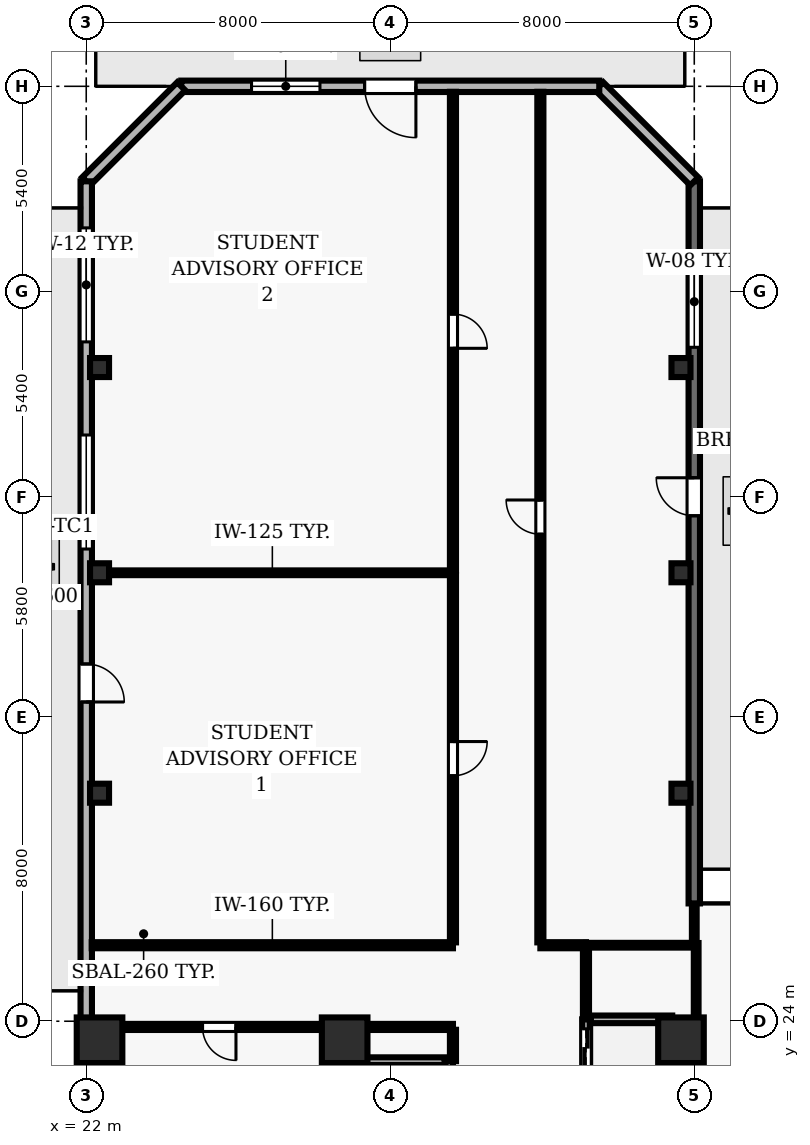
"""IFC4 building model, lengths in metres.
Left out: names, types, materials, properties, quantities, classifications, styles, units other than length and angle.
Written with IfcOpenShell. Run it as: python <this file> out.ifc"""

import sys

from ifc_helpers import new_model, si_unit, direction, frame, frame_2d, origin, origin_2d, place, context, subcontext, project, spatial, rectangle, hollow_rectangle, extrude, element, fill, save


model = new_model("IFC4")
c1 = context("Model", 3, precision=1e-05, world=origin(), true_north=direction((0.0, 1.0)))
c2 = subcontext(c1, "Body", "Model", "MODEL_VIEW")
j1 = project(units=[si_unit("LENGTHUNIT", "METRE"), si_unit("PLANEANGLEUNIT", "RADIAN")], contexts=[c1])
p1 = place(None, origin())
s1 = spatial("IfcSite", under=j1, at=p1, CompositionType="ELEMENT")
p2 = place(p1, origin())
s2 = spatial("IfcBuilding", under=s1, at=p2, CompositionType="ELEMENT")
p3 = place(p2, frame((0.0, 0.0, 98.4)))
s3 = spatial("IfcBuildingStorey", under=s2, at=p3, CompositionType="ELEMENT", Elevation=98.4)
for number, where, z_axis, x_axis in (
    (1, (22.35, 23.5, 0.0), (0.0, 0.0, 1.0), (1.0, 0.0, 0.0)),
    (2, (28.8, 23.5, 0.0), (0.0, 0.0, 1.0), (1.0, 0.0, 0.0)),
    (3, (37.65, 23.5, 0.0), (0.0, 0.0, 1.0), (1.0, 0.0, 0.0)),
):
    element("IfcColumn", number, at=place(p3, frame(where, z_axis=z_axis, x_axis=x_axis)), inside=s3, PredefinedType="COLUMN", context=c2, shape_type="SweptSolid", body=[
        extrude(rectangle(XDim=1.2, YDim=1.2, at=origin_2d()), origin(), (0.0, 0.0, 1.0), 5.0),
    ])
for number, where, z_axis, x_axis in (
    (4, (22.35, 30.0, 0.0), (0.0, 0.0, 1.0), (1.0, 0.0, 0.0)),
    (5, (37.65, 30.0, 0.0), (0.0, 0.0, 1.0), (1.0, 0.0, 0.0)),
    (6, (22.35, 35.8, 0.0), (0.0, 0.0, 1.0), (1.0, 0.0, 0.0)),
    (7, (37.65, 35.8, 0.0), (0.0, 0.0, 1.0), (1.0, 0.0, 0.0)),
    (8, (22.35, 41.2, 0.0), (0.0, 0.0, 1.0), (1.0, 0.0, 0.0)),
    (9, (37.65, 41.2, 0.0), (0.0, 0.0, 1.0), (1.0, 0.0, 0.0)),
):
    element("IfcColumn", number, at=place(p3, frame(where, z_axis=z_axis, x_axis=x_axis)), inside=s3, PredefinedType="COLUMN", context=c2, shape_type="SweptSolid", body=[
        extrude(hollow_rectangle(XDim=0.5, YDim=0.5, WallThickness=0.025, at=origin_2d()), origin(), (0.0, 0.0, 1.0), 5.0),
    ])
p4 = place(p3, frame((38.0, 27.1, 0.0), z_axis=(0.0, 0.0, 1.0), x_axis=(0.0, 1.0, 0.0)))
e10 = element("IfcWall", 10, at=p4, inside=s3, PredefinedType="SOLIDWALL", context=c2, shape_type="SweptSolid", body=[
    extrude(rectangle(XDim=19.0, YDim=0.3, at=frame_2d((9.5, 0.0))), origin(), (0.0, 0.0, 1.0), 4.79),
])
p5 = place(p4, frame((10.2, 0.0, 0.0)))
e11 = element("IfcOpeningElement", 11, at=p5, cuts=e10, PredefinedType="OPENING", context=c2, shape_type="SweptSolid", body=[
    extrude(rectangle(XDim=1.0, YDim=2.2, at=frame_2d((0.5, 1.1))), frame((0.0, 0.16, 0.0), z_axis=(0.0, -1.0, 0.0), x_axis=(1.0, 0.0, 0.0)), (0.0, 0.0, 1.0), 0.32),
])
p6 = place(p4, frame((14.633, 0.0, 0.9)))
e12 = element("IfcOpeningElement", 12, at=p6, cuts=e10, PredefinedType="OPENING", context=c2, shape_type="SweptSolid", body=[
    extrude(rectangle(XDim=2.4, YDim=1.8, at=frame_2d((1.2, 0.9))), frame((0.0, 0.16, 0.0), z_axis=(0.0, -1.0, 0.0), x_axis=(1.0, 0.0, 0.0)), (0.0, 0.0, 1.0), 0.32),
])
p7 = place(p3, frame((38.0, 46.1, 0.0), z_axis=(0.0, 0.0, 1.0), x_axis=(-0.707106781187, 0.707106781187, 0.0)))
e13 = element("IfcWall", 13, at=p7, inside=s3, PredefinedType="SOLIDWALL", context=c2, shape_type="SweptSolid", body=[
    extrude(rectangle(XDim=3.536, YDim=0.3, at=frame_2d((1.768, 0.0))), origin(), (0.0, 0.0, 1.0), 4.79),
])
p8 = place(p3, frame((35.5, 48.6, 0.0), z_axis=(0.0, 0.0, 1.0), x_axis=(-1.0, 0.0, 0.0)))
e14 = element("IfcWall", 14, at=p8, inside=s3, PredefinedType="SOLIDWALL", context=c2, shape_type="SweptSolid", body=[
    extrude(rectangle(XDim=11.0, YDim=0.3, at=frame_2d((5.5, 0.0))), origin(), (0.0, 0.0, 1.0), 4.79),
])
p9 = place(p8, frame((4.825, 0.0, 0.0)))
e15 = element("IfcOpeningElement", 15, at=p9, cuts=e14, PredefinedType="OPENING", context=c2, shape_type="SweptSolid", body=[
    extrude(rectangle(XDim=1.35, YDim=2.2, at=frame_2d((0.675, 1.1))), frame((0.0, 0.16, 0.0), z_axis=(0.0, -1.0, 0.0), x_axis=(1.0, 0.0, 0.0)), (0.0, 0.0, 1.0), 0.32),
])
p10 = place(p8, frame((7.35, 0.0, 0.9)))
e16 = element("IfcOpeningElement", 16, at=p10, cuts=e14, PredefinedType="OPENING", context=c2, shape_type="SweptSolid", body=[
    extrude(rectangle(XDim=1.8, YDim=2.2, at=frame_2d((0.9, 1.1))), frame((0.0, 0.16, 0.0), z_axis=(0.0, -1.0, 0.0), x_axis=(1.0, 0.0, 0.0)), (0.0, 0.0, 1.0), 0.32),
])
p11 = place(p3, frame((24.5, 48.6, 0.0), z_axis=(0.0, 0.0, 1.0), x_axis=(-0.707106781187, -0.707106781187, 0.0)))
e17 = element("IfcWall", 17, at=p11, inside=s3, PredefinedType="SOLIDWALL", context=c2, shape_type="SweptSolid", body=[
    extrude(rectangle(XDim=3.536, YDim=0.3, at=frame_2d((1.768, 0.0))), origin(), (0.0, 0.0, 1.0), 4.79),
])
p12 = place(p3, frame((22.0, 46.1, 0.0), z_axis=(0.0, 0.0, 1.0), x_axis=(0.0, -1.0, 0.0)))
e18 = element("IfcWall", 18, at=p12, inside=s3, PredefinedType="SOLIDWALL", context=c2, shape_type="SweptSolid", body=[
    extrude(rectangle(XDim=43.6, YDim=0.3, at=frame_2d((21.8, 0.0))), origin(), (0.0, 0.0, 1.0), 4.79),
])
p13 = place(p12, frame((12.7, 0.0, 0.0)))
e19 = element("IfcOpeningElement", 19, at=p13, cuts=e18, PredefinedType="OPENING", context=c2, shape_type="SweptSolid", body=[
    extrude(rectangle(XDim=1.0, YDim=2.2, at=frame_2d((0.5, 1.1))), frame((0.0, 0.16, 0.0), z_axis=(0.0, -1.0, 0.0), x_axis=(1.0, 0.0, 0.0)), (0.0, 0.0, 1.0), 0.32),
])
p14 = place(p12, frame((1.225, 0.0, 0.9)))
e20 = element("IfcOpeningElement", 20, at=p14, cuts=e18, PredefinedType="OPENING", context=c2, shape_type="SweptSolid", body=[
    extrude(rectangle(XDim=3.0, YDim=2.2, at=frame_2d((1.5, 1.1))), frame((0.0, 0.16, 0.0), z_axis=(0.0, -1.0, 0.0), x_axis=(1.0, 0.0, 0.0)), (0.0, 0.0, 1.0), 0.32),
])
p15 = place(p12, frame((6.675, 0.0, 0.9)))
e21 = element("IfcOpeningElement", 21, at=p15, cuts=e18, PredefinedType="OPENING", context=c2, shape_type="SweptSolid", body=[
    extrude(rectangle(XDim=3.0, YDim=2.2, at=frame_2d((1.5, 1.1))), frame((0.0, 0.16, 0.0), z_axis=(0.0, -1.0, 0.0), x_axis=(1.0, 0.0, 0.0)), (0.0, 0.0, 1.0), 0.32),
])
p16 = place(p12, frame((23.475, 0.0, 0.9)))
e22 = element("IfcOpeningElement", 22, at=p16, cuts=e18, PredefinedType="OPENING", context=c2, shape_type="SweptSolid", body=[
    extrude(rectangle(XDim=3.0, YDim=2.2, at=frame_2d((1.5, 1.1))), frame((0.0, 0.16, 0.0), z_axis=(0.0, -1.0, 0.0), x_axis=(1.0, 0.0, 0.0)), (0.0, 0.0, 1.0), 0.32),
])
p17 = place(p12, frame((33.925, 0.0, 0.9)))
e23 = element("IfcOpeningElement", 23, at=p17, cuts=e18, PredefinedType="OPENING", context=c2, shape_type="SweptSolid", body=[
    extrude(rectangle(XDim=3.0, YDim=2.2, at=frame_2d((1.5, 1.1))), frame((0.0, 0.16, 0.0), z_axis=(0.0, -1.0, 0.0), x_axis=(1.0, 0.0, 0.0)), (0.0, 0.0, 1.0), 0.32),
])
p18 = place(p3, frame((35.15, 24.05, 0.0), z_axis=(0.0, 0.0, 1.0), x_axis=(0.0, -1.0, 0.0)))
e24 = element("IfcWall", 24, at=p18, inside=s3, PredefinedType="SOLIDWALL", context=c2, shape_type="SweptSolid", body=[
    extrude(rectangle(XDim=1.5, YDim=0.2, at=frame_2d((0.75, 0.0))), origin(), (0.0, 0.0, 1.0), 4.79),
])
p19 = place(p18, frame((0.25, 0.0, 0.0)))
e25 = element("IfcOpeningElement", 25, at=p19, cuts=e24, PredefinedType="OPENING", context=c2, shape_type="SweptSolid", body=[
    extrude(rectangle(XDim=1.0, YDim=2.1, at=frame_2d((0.5, 1.05))), frame((0.0, 0.11, 0.0), z_axis=(0.0, -1.0, 0.0), x_axis=(1.0, 0.0, 0.0)), (0.0, 0.0, 1.0), 0.22),
])
p20 = place(p3, frame((37.7, 22.55, 0.0), z_axis=(0.0, 0.0, 1.0), x_axis=(0.0, 1.0, 0.0)))
e26 = element("IfcWall", 26, at=p20, inside=s3, PredefinedType="SHEAR", context=c2, shape_type="SweptSolid", body=[
    extrude(rectangle(XDim=1.5, YDim=0.5, at=frame_2d((0.75, 0.0))), origin(), (0.0, 0.0, 1.0), 4.79),
])
p21 = place(p3, frame((37.42, 24.05, 0.0), z_axis=(0.0, 0.0, 1.0), x_axis=(-1.0, 0.0, 0.0)))
e27 = element("IfcWall", 27, at=p21, inside=s3, PredefinedType="SOLIDWALL", context=c2, shape_type="SweptSolid", body=[
    extrude(rectangle(XDim=2.14, YDim=0.2, at=frame_2d((1.07, 0.0))), origin(), (0.0, 0.0, 1.0), 4.79),
])
p22 = place(p3, frame((28.85, 22.95, 0.0), z_axis=(0.0, 0.0, 1.0), x_axis=(0.0, -1.0, 0.0)))
e28 = element("IfcWall", 28, at=p22, inside=s3, PredefinedType="SOLIDWALL", context=c2, shape_type="SweptSolid", body=[
    extrude(rectangle(XDim=1.9, YDim=0.2, at=frame_2d((0.95, 0.0))), origin(), (0.0, 0.0, 1.0), 4.79),
])
p23 = place(p3, frame((31.55, 21.05, 0.0), z_axis=(0.0, 0.0, 1.0), x_axis=(0.0, 1.0, 0.0)))
e29 = element("IfcWall", 29, at=p23, inside=s3, PredefinedType="SOLIDWALL", context=c2, shape_type="SweptSolid", body=[
    extrude(rectangle(XDim=1.9, YDim=0.2, at=frame_2d((0.95, 0.0))), origin(), (0.0, 0.0, 1.0), 4.79),
])
p24 = place(p23, frame((0.45, 0.0, 0.0)))
e30 = element("IfcOpeningElement", 30, at=p24, cuts=e29, PredefinedType="OPENING", context=c2, shape_type="SweptSolid", body=[
    extrude(rectangle(XDim=1.0, YDim=2.1, at=frame_2d((0.5, 1.05))), frame((0.0, 0.11, 0.0), z_axis=(0.0, -1.0, 0.0), x_axis=(1.0, 0.0, 0.0)), (0.0, 0.0, 1.0), 0.22),
])
p25 = place(p3, frame((31.43, 22.95, 0.0), z_axis=(0.0, 0.0, 1.0), x_axis=(-1.0, 0.0, 0.0)))
e31 = element("IfcWall", 31, at=p25, inside=s3, PredefinedType="SOLIDWALL", context=c2, shape_type="SweptSolid", body=[
    extrude(rectangle(XDim=2.46, YDim=0.2, at=frame_2d((1.23, 0.0))), origin(), (0.0, 0.0, 1.0), 4.79),
])
p26 = place(p3, frame((28.8, 23.85, 0.0), z_axis=(0.0, 0.0, 1.0), x_axis=(-1.0, 0.0, 0.0)))
e32 = element("IfcWall", 32, at=p26, inside=s3, PredefinedType="PARTITIONING", context=c2, shape_type="SweptSolid", body=[
    extrude(rectangle(XDim=6.6, YDim=0.16, at=frame_2d((3.3, 0.0))), origin(), (0.0, 0.0, 1.0), 4.173),
])
p27 = place(p26, frame((2.86, 0.0, 0.0)))
e33 = element("IfcOpeningElement", 33, at=p27, cuts=e32, PredefinedType="OPENING", context=c2, shape_type="SweptSolid", body=[
    extrude(rectangle(XDim=0.88, YDim=2.1, at=frame_2d((0.44, 1.05))), frame((0.0, 0.09, 0.0), z_axis=(0.0, -1.0, 0.0), x_axis=(1.0, 0.0, 0.0)), (0.0, 0.0, 1.0), 0.18),
])
p28 = place(p3, frame((28.8, 23.85, 0.0), z_axis=(0.0, 0.0, 1.0), x_axis=(1.0, 0.0, 0.0)))
e34 = element("IfcWall", 34, at=p28, inside=s3, PredefinedType="PARTITIONING", context=c2, shape_type="SweptSolid", body=[
    extrude(rectangle(XDim=2.85, YDim=0.16, at=frame_2d((1.425, 0.0))), origin(), (0.0, 0.0, 1.0), 4.79),
])
p29 = place(p3, frame((31.65, 26.0, 0.0), z_axis=(0.0, 0.0, 1.0), x_axis=(-1.0, 0.0, 0.0)))
e35 = element("IfcWall", 35, at=p29, inside=s3, PredefinedType="PARTITIONING", context=c2, shape_type="SweptSolid", body=[
    extrude(rectangle(XDim=9.505, YDim=0.16, at=frame_2d((4.752, 0.0))), origin(), (0.0, 0.0, 1.0), 4.79),
])
p30 = place(p3, frame((31.65, 35.8, 0.0), z_axis=(0.0, 0.0, 1.0), x_axis=(-1.0, 0.0, 0.0)))
e36 = element("IfcWall", 36, at=p30, inside=s3, PredefinedType="PARTITIONING", context=c2, shape_type="SweptSolid", body=[
    extrude(rectangle(XDim=9.505, YDim=0.125, at=frame_2d((4.752, 0.0))), origin(), (0.0, 0.0, 1.0), 4.173),
])
p31 = place(p3, frame((35.15, 26.0, 0.0), z_axis=(0.0, 0.0, 1.0), x_axis=(-1.0, 0.0, 0.0)))
e37 = element("IfcWall", 37, at=p31, inside=s3, PredefinedType="PARTITIONING", context=c2, shape_type="SweptSolid", body=[
    extrude(rectangle(XDim=1.2, YDim=0.16, at=frame_2d((0.6, 0.0))), origin(), (0.0, 0.0, 1.0), 4.79),
])
p32 = place(p3, frame((35.15, 26.0, 0.0), z_axis=(0.0, 0.0, 1.0), x_axis=(1.0, 0.0, 0.0)))
e38 = element("IfcWall", 38, at=p32, inside=s3, PredefinedType="PARTITIONING", context=c2, shape_type="SweptSolid", body=[
    extrude(rectangle(XDim=2.85, YDim=0.125, at=frame_2d((1.425, 0.0))), origin(), (0.0, 0.0, 1.0), 4.79),
])
p33 = place(p3, frame((28.8, 22.95, 0.0), z_axis=(0.0, 0.0, 1.0), x_axis=(0.0, 1.0, 0.0)))
e39 = element("IfcWall", 39, at=p33, inside=s3, PredefinedType="PARTITIONING", context=c2, shape_type="SweptSolid", body=[
    extrude(rectangle(XDim=0.825, YDim=0.135, at=frame_2d((0.413, 0.0))), origin(), (0.0, 0.0, 1.0), 4.79),
])
p34 = place(p3, frame((31.65, 23.775, 0.0), z_axis=(0.0, 0.0, 1.0), x_axis=(0.0, -1.0, 0.0)))
e40 = element("IfcWall", 40, at=p34, inside=s3, PredefinedType="PARTITIONING", context=c2, shape_type="SweptSolid", body=[
    extrude(rectangle(XDim=0.825, YDim=0.16, at=frame_2d((0.413, 0.0))), origin(), (0.0, 0.0, 1.0), 4.79),
])
p35 = place(p3, frame((31.65, 35.742, 0.0), z_axis=(0.0, 0.0, 1.0), x_axis=(0.0, -1.0, 0.0)))
e41 = element("IfcWall", 41, at=p35, inside=s3, PredefinedType="PARTITIONING", context=c2, shape_type="SweptSolid", body=[
    extrude(rectangle(XDim=9.667, YDim=0.16, at=frame_2d((4.833, 0.0))), origin(), (0.0, 0.0, 1.0), 4.79),
])
p36 = place(p35, frame((4.383, 0.0, 0.0)))
e42 = element("IfcOpeningElement", 42, at=p36, cuts=e41, PredefinedType="OPENING", context=c2, shape_type="SweptSolid", body=[
    extrude(rectangle(XDim=0.9, YDim=2.1, at=frame_2d((0.45, 1.05))), frame((0.0, 0.09, 0.0), z_axis=(0.0, -1.0, 0.0), x_axis=(1.0, 0.0, 0.0)), (0.0, 0.0, 1.0), 0.18),
])
p37 = place(p3, frame((31.65, 48.455, 0.0), z_axis=(0.0, 0.0, 1.0), x_axis=(0.0, -1.0, 0.0)))
e43 = element("IfcWall", 43, at=p37, inside=s3, PredefinedType="PARTITIONING", context=c2, shape_type="SweptSolid", body=[
    extrude(rectangle(XDim=12.598, YDim=0.16, at=frame_2d((6.299, 0.0))), origin(), (0.0, 0.0, 1.0), 4.79),
])
p38 = place(p37, frame((5.849, 0.0, 0.0)))
e44 = element("IfcOpeningElement", 44, at=p38, cuts=e43, PredefinedType="OPENING", context=c2, shape_type="SweptSolid", body=[
    extrude(rectangle(XDim=0.9, YDim=2.1, at=frame_2d((0.45, 1.05))), frame((0.0, 0.09, 0.0), z_axis=(0.0, -1.0, 0.0), x_axis=(1.0, 0.0, 0.0)), (0.0, 0.0, 1.0), 0.18),
])
p39 = place(p3, frame((33.95, 26.075, 0.0), z_axis=(0.0, 0.0, 1.0), x_axis=(0.0, 1.0, 0.0)))
e45 = element("IfcWall", 45, at=p39, inside=s3, PredefinedType="PARTITIONING", context=c2, shape_type="SweptSolid", body=[
    extrude(rectangle(XDim=22.38, YDim=0.16, at=frame_2d((11.19, 0.0))), origin(), (0.0, 0.0, 1.0), 4.79),
])
p40 = place(p39, frame((10.74, 0.0, 0.0)))
e46 = element("IfcOpeningElement", 46, at=p40, cuts=e45, PredefinedType="OPENING", context=c2, shape_type="SweptSolid", body=[
    extrude(rectangle(XDim=0.9, YDim=2.1, at=frame_2d((0.45, 1.05))), frame((0.0, 0.09, 0.0), z_axis=(0.0, -1.0, 0.0), x_axis=(1.0, 0.0, 0.0)), (0.0, 0.0, 1.0), 0.18),
])
p41 = place(p3, frame((35.15, 24.07, 0.0), z_axis=(0.0, 0.0, 1.0), x_axis=(0.0, 1.0, 0.0)))
e47 = element("IfcWall", 47, at=p41, inside=s3, PredefinedType="PARTITIONING", context=c2, shape_type="SweptSolid", body=[
    extrude(rectangle(XDim=1.855, YDim=0.16, at=frame_2d((0.927, 0.0))), origin(), (0.0, 0.0, 1.0), 4.79),
])
p42 = place(p3, frame((38.0, 26.058, 0.0), z_axis=(0.0, 0.0, 1.0), x_axis=(0.0, 1.0, 0.0)))
e48 = element("IfcWall", 48, at=p42, inside=s3, PredefinedType="PARTITIONING", context=c2, shape_type="SweptSolid", body=[
    extrude(rectangle(XDim=0.962, YDim=0.125, at=frame_2d((0.481, 0.0))), origin(), (0.0, 0.0, 1.0), 4.173),
])
p43 = place(p3, frame((38.05, 26.058, 0.0), z_axis=(0.0, 0.0, 1.0), x_axis=(0.0, -1.0, 0.0)))
e49 = element("IfcWall", 49, at=p43, inside=s3, PredefinedType="PARTITIONING", context=c2, shape_type="SweptSolid", body=[
    extrude(rectangle(XDim=9.983, YDim=0.125, at=frame_2d((4.992, 0.0))), origin(), (0.0, 0.0, 1.0), 4.173),
])
p44 = place(p5, origin())
e50 = element("IfcDoor", 50, at=p44, inside=s3, OperationType="SINGLE_SWING_RIGHT", PredefinedType="DOOR", context=c2, shape_type="SweptSolid", body=[
    extrude(rectangle(XDim=1.0, YDim=2.2, at=frame_2d((0.5, 1.1))), frame((0.0, 0.025, 0.0), z_axis=(0.0, -1.0, 0.0), x_axis=(1.0, 0.0, 0.0)), (0.0, 0.0, 1.0), 0.05),
])
fill(e11, e50)
p45 = place(p6, origin())
e51 = element("IfcWindow", 51, at=p45, inside=s3, PartitioningType="SINGLE_PANEL", PredefinedType="WINDOW", context=c2, shape_type="SweptSolid", body=[
    extrude(rectangle(XDim=2.4, YDim=1.8, at=frame_2d((1.2, 0.9))), frame((0.0, 0.03, 0.0), z_axis=(0.0, -1.0, 0.0), x_axis=(1.0, 0.0, 0.0)), (0.0, 0.0, 1.0), 0.06),
])
fill(e12, e51)
p46 = place(p9, origin())
e52 = element("IfcDoor", 52, at=p46, inside=s3, OperationType="SINGLE_SWING_LEFT", PredefinedType="DOOR", context=c2, shape_type="SweptSolid", body=[
    extrude(rectangle(XDim=1.35, YDim=2.2, at=frame_2d((0.675, 1.1))), frame((0.0, 0.025, 0.0), z_axis=(0.0, -1.0, 0.0), x_axis=(1.0, 0.0, 0.0)), (0.0, 0.0, 1.0), 0.05),
])
fill(e15, e52)
p47 = place(p10, origin())
e53 = element("IfcWindow", 53, at=p47, inside=s3, PartitioningType="SINGLE_PANEL", PredefinedType="WINDOW", context=c2, shape_type="SweptSolid", body=[
    extrude(rectangle(XDim=1.8, YDim=2.2, at=frame_2d((0.9, 1.1))), frame((0.0, 0.03, 0.0), z_axis=(0.0, -1.0, 0.0), x_axis=(1.0, 0.0, 0.0)), (0.0, 0.0, 1.0), 0.06),
])
fill(e16, e53)
p48 = place(p13, origin())
e54 = element("IfcDoor", 54, at=p48, inside=s3, OperationType="SINGLE_SWING_RIGHT", PredefinedType="DOOR", context=c2, shape_type="SweptSolid", body=[
    extrude(rectangle(XDim=1.0, YDim=2.2, at=frame_2d((0.5, 1.1))), frame((0.0, 0.025, 0.0), z_axis=(0.0, -1.0, 0.0), x_axis=(1.0, 0.0, 0.0)), (0.0, 0.0, 1.0), 0.05),
])
fill(e19, e54)
p49 = place(p14, origin())
e55 = element("IfcWindow", 55, at=p49, inside=s3, PartitioningType="SINGLE_PANEL", PredefinedType="WINDOW", context=c2, shape_type="SweptSolid", body=[
    extrude(rectangle(XDim=3.0, YDim=2.2, at=frame_2d((1.5, 1.1))), frame((0.0, 0.03, 0.0), z_axis=(0.0, -1.0, 0.0), x_axis=(1.0, 0.0, 0.0)), (0.0, 0.0, 1.0), 0.06),
])
fill(e20, e55)
p50 = place(p15, origin())
e56 = element("IfcWindow", 56, at=p50, inside=s3, PartitioningType="SINGLE_PANEL", PredefinedType="WINDOW", context=c2, shape_type="SweptSolid", body=[
    extrude(rectangle(XDim=3.0, YDim=2.2, at=frame_2d((1.5, 1.1))), frame((0.0, 0.03, 0.0), z_axis=(0.0, -1.0, 0.0), x_axis=(1.0, 0.0, 0.0)), (0.0, 0.0, 1.0), 0.06),
])
fill(e21, e56)
p51 = place(p19, origin())
e57 = element("IfcDoor", 57, at=p51, inside=s3, OperationType="DOUBLE_DOOR_SLIDING", PredefinedType="DOOR", context=c2, shape_type="SweptSolid", body=[
    extrude(rectangle(XDim=1.0, YDim=2.1, at=frame_2d((0.5, 1.05))), frame((0.0, 0.025, 0.0), z_axis=(0.0, -1.0, 0.0), x_axis=(1.0, 0.0, 0.0)), (0.0, 0.0, 1.0), 0.05),
])
fill(e25, e57)
p52 = place(p27, origin())
e58 = element("IfcDoor", 58, at=p52, inside=s3, OperationType="SINGLE_SWING_LEFT", PredefinedType="DOOR", context=c2, shape_type="SweptSolid", body=[
    extrude(rectangle(XDim=0.88, YDim=2.1, at=frame_2d((0.44, 1.05))), frame((0.0, 0.025, 0.0), z_axis=(0.0, -1.0, 0.0), x_axis=(1.0, 0.0, 0.0)), (0.0, 0.0, 1.0), 0.05),
])
fill(e33, e58)
p53 = place(p40, origin())
e59 = element("IfcDoor", 59, at=p53, inside=s3, OperationType="SINGLE_SWING_RIGHT", PredefinedType="DOOR", context=c2, shape_type="SweptSolid", body=[
    extrude(rectangle(XDim=0.9, YDim=2.1, at=frame_2d((0.45, 1.05))), frame((0.0, 0.025, 0.0), z_axis=(0.0, -1.0, 0.0), x_axis=(1.0, 0.0, 0.0)), (0.0, 0.0, 1.0), 0.05),
])
fill(e46, e59)
p54 = place(p36, origin())
e60 = element("IfcDoor", 60, at=p54, inside=s3, OperationType="SINGLE_SWING_LEFT", PredefinedType="DOOR", context=c2, shape_type="SweptSolid", body=[
    extrude(rectangle(XDim=0.9, YDim=2.1, at=frame_2d((0.45, 1.05))), frame((0.0, 0.025, 0.0), z_axis=(0.0, -1.0, 0.0), x_axis=(1.0, 0.0, 0.0)), (0.0, 0.0, 1.0), 0.05),
])
fill(e42, e60)
p55 = place(p38, origin())
e61 = element("IfcDoor", 61, at=p55, inside=s3, OperationType="SINGLE_SWING_RIGHT", PredefinedType="DOOR", context=c2, shape_type="SweptSolid", body=[
    extrude(rectangle(XDim=0.9, YDim=2.1, at=frame_2d((0.45, 1.05))), frame((0.0, 0.025, 0.0), z_axis=(0.0, -1.0, 0.0), x_axis=(1.0, 0.0, 0.0)), (0.0, 0.0, 1.0), 0.05),
])
fill(e44, e61)
save(model, sys.argv[1])
